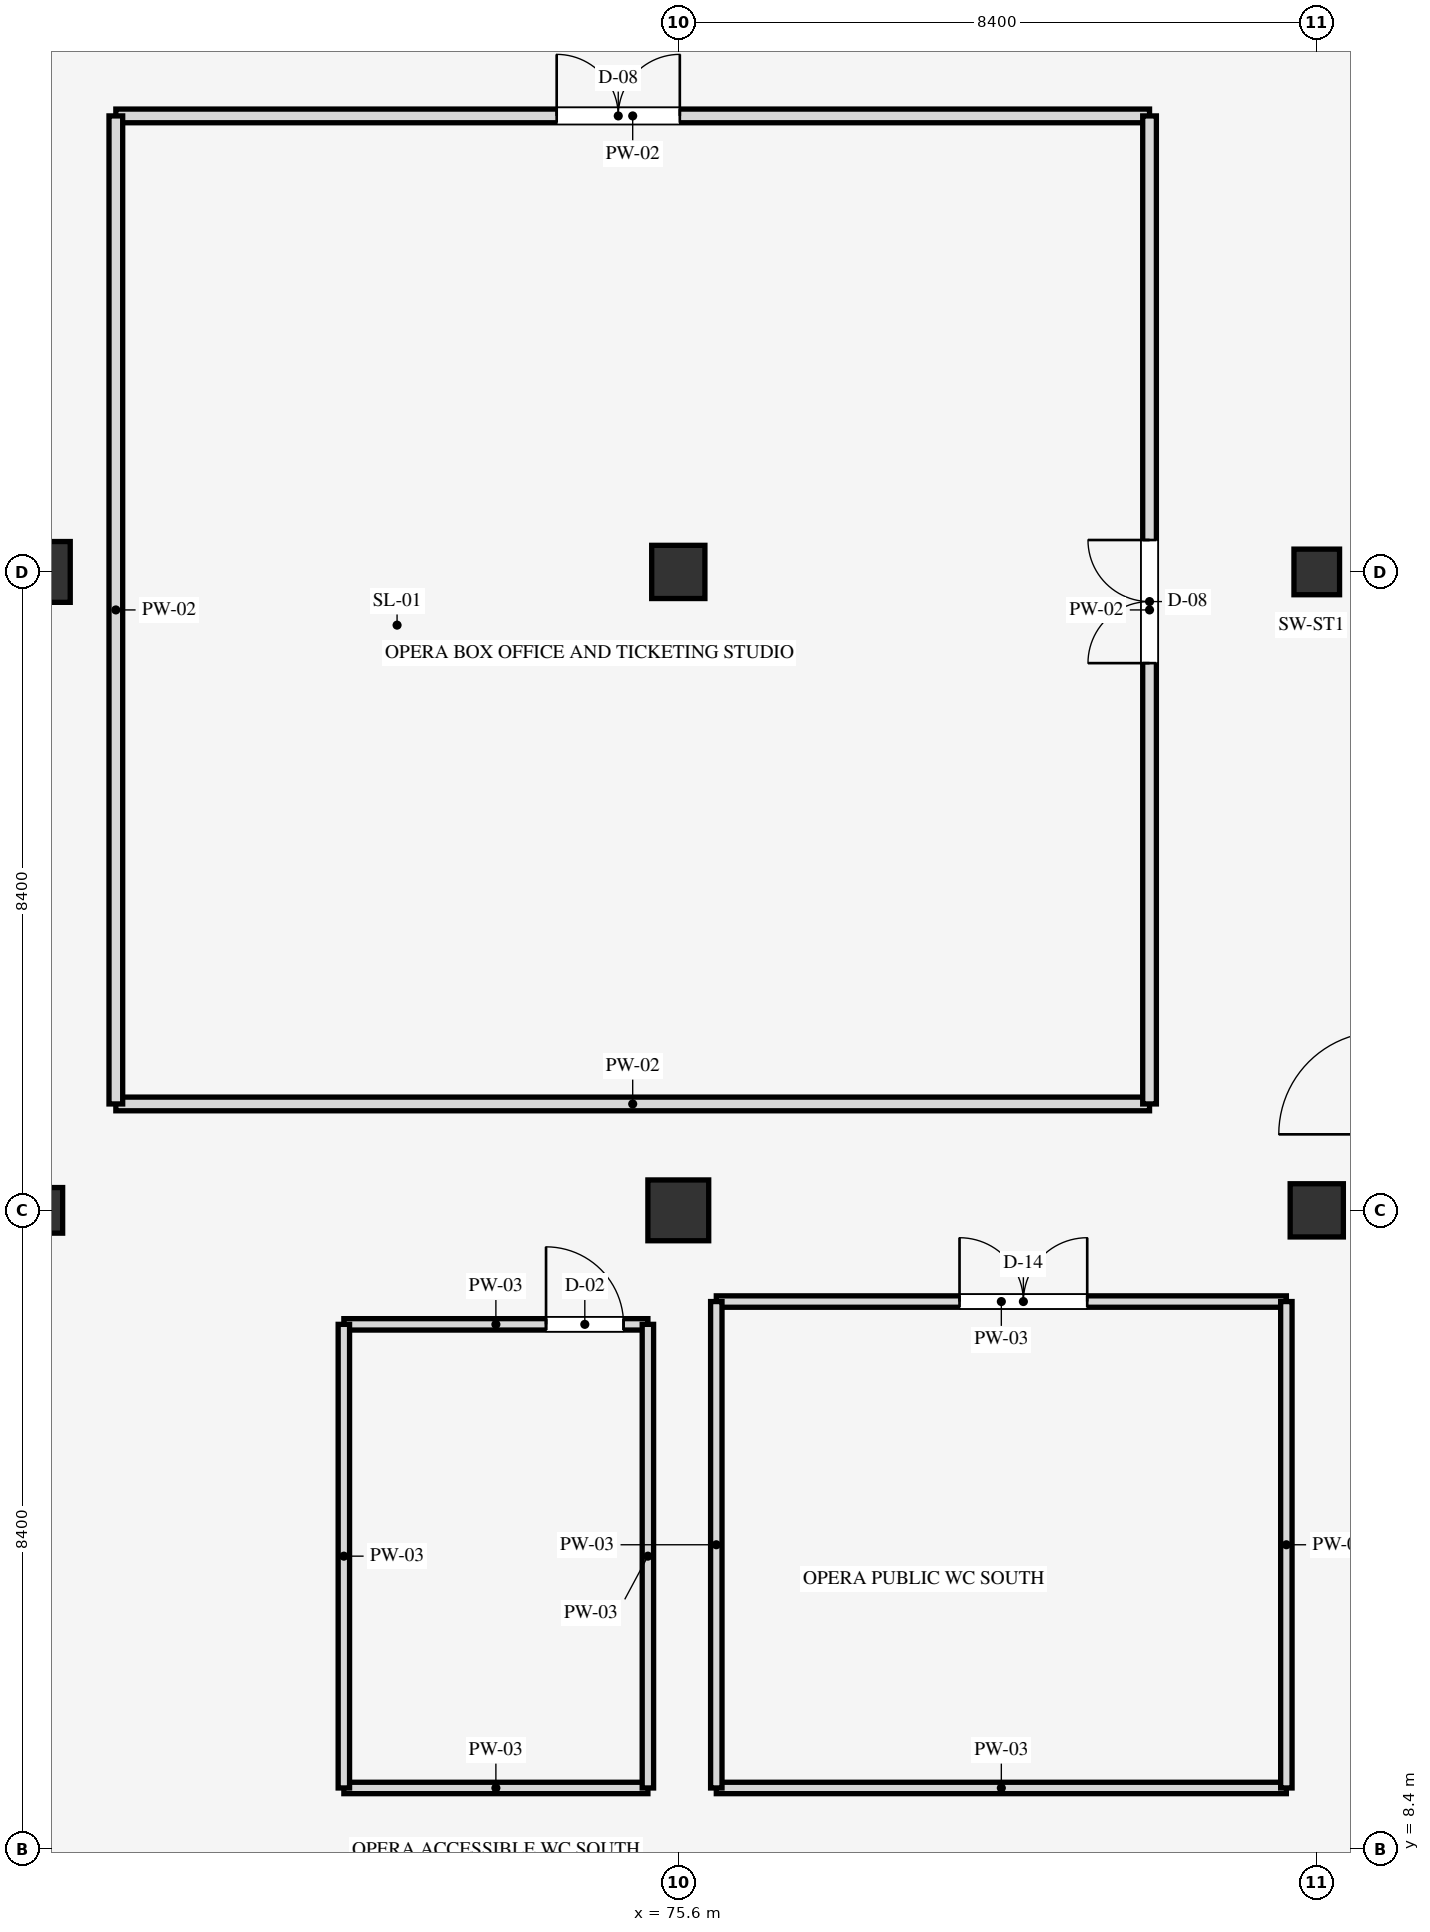
"""IFC4 building model, lengths in metres.
Left out: names, types, materials, properties, quantities, classifications, styles, units other than length and angle.
Written with IfcOpenShell. Run it as: python <this file> out.ifc"""

import sys

from ifc_helpers import new_model, si_unit, direction, frame, frame_2d, origin, origin_2d, place, context, subcontext, project, spatial, rectangle, extrude, element, fill, save


model = new_model("IFC4")
c1 = context("Model", 3, precision=1e-05, world=origin(), true_north=direction((0.0, 1.0)))
c2 = subcontext(c1, "Body", "Model", "MODEL_VIEW")
j1 = project(units=[si_unit("LENGTHUNIT", "METRE"), si_unit("PLANEANGLEUNIT", "RADIAN")], contexts=[c1])
p1 = place(None, origin())
s1 = spatial("IfcSite", under=j1, at=p1, CompositionType="ELEMENT")
p2 = place(p1, origin())
s2 = spatial("IfcBuilding", under=s1, at=p2, CompositionType="ELEMENT")
p3 = place(p2, origin())
s3 = spatial("IfcBuildingStorey", under=s2, at=p3, CompositionType="ELEMENT", Elevation=0.0)
p4 = place(p3, frame((67.2, 16.8, 0.0), z_axis=(0.0, 0.0, 1.0), x_axis=(1.0, 0.0, 0.0)))
e1 = element("IfcColumn", 1, at=p4, inside=s3, PredefinedType="COLUMN", context=c2, shape_type="SweptSolid", body=[
    extrude(rectangle(XDim=0.6, YDim=0.6, at=origin_2d()), origin(), (0.0, 0.0, 1.0), 5.4),
])
for number, where, z_axis, x_axis in (
    (2, (67.2, 25.2, 0.0), (0.0, 0.0, 1.0), (1.0, 0.0, 0.0)),
    (3, (75.6, 16.8, 0.0), (0.0, 0.0, 1.0), (1.0, 0.0, 0.0)),
):
    element("IfcColumn", number, at=place(p3, frame(where, z_axis=z_axis, x_axis=x_axis)), inside=s3, PredefinedType="COLUMN", context=c2, shape_type="SweptSolid", body=[
        extrude(rectangle(XDim=0.8, YDim=0.8, at=origin_2d()), origin(), (0.0, 0.0, 1.0), 5.4),
    ])
for number, where, z_axis, x_axis in (
    (4, (75.6, 25.2, 0.0), (0.0, 0.0, 1.0), (1.0, 0.0, 0.0)),
    (5, (84.0, 16.8, 0.0), (0.0, 0.0, 1.0), (1.0, 0.0, 0.0)),
):
    element("IfcColumn", number, at=place(p3, frame(where, z_axis=z_axis, x_axis=x_axis)), inside=s3, PredefinedType="COLUMN", context=c2, shape_type="SweptSolid", body=[
        extrude(rectangle(XDim=0.7, YDim=0.7, at=origin_2d()), origin(), (0.0, 0.0, 1.0), 5.4),
    ])
p5 = place(p3, frame((84.0, 25.2, 0.0), z_axis=(0.0, 0.0, 1.0), x_axis=(1.0, 0.0, 0.0)))
e6 = element("IfcColumn", 6, at=p5, inside=s3, PredefinedType="COLUMN", context=c2, shape_type="SweptSolid", body=[
    extrude(rectangle(XDim=0.6, YDim=0.6, at=origin_2d()), origin(), (0.0, 0.0, 1.0), 5.4),
])
p6 = place(p3, frame((76.1, 9.2, 0.0), z_axis=(0.0, 0.0, 1.0), x_axis=(1.0, 0.0, 0.0)))
e7 = element("IfcWall", 7, at=p6, inside=s3, PredefinedType="PARTITIONING", context=c2, shape_type="SweptSolid", body=[
    extrude(rectangle(XDim=7.5, YDim=0.15, at=frame_2d((3.75, 0.0))), origin(), (0.0, 0.0, 1.0), 4.44),
])
p7 = place(p3, frame((76.1, 15.6, 0.0), z_axis=(0.0, 0.0, 1.0), x_axis=(1.0, 0.0, 0.0)))
e8 = element("IfcWall", 8, at=p7, inside=s3, PredefinedType="PARTITIONING", context=c2, shape_type="SweptSolid", body=[
    extrude(rectangle(XDim=7.5, YDim=0.15, at=frame_2d((3.75, 0.0))), origin(), (0.0, 0.0, 1.0), 4.44),
])
p8 = place(p7, frame((3.2, 0.0, 0.0)))
e9 = element("IfcOpeningElement", 9, at=p8, cuts=e8, PredefinedType="OPENING", context=c2, shape_type="SweptSolid", body=[
    extrude(rectangle(XDim=1.68, YDim=2.24, at=frame_2d((0.84, 1.12))), frame((0.0, 0.085, 0.0), z_axis=(0.0, -1.0, 0.0), x_axis=(1.0, 0.0, 0.0)), (0.0, 0.0, 1.0), 0.17),
])
for number, where, z_axis, x_axis in (
    (10, (76.1, 9.2, 0.0), (0.0, 0.0, 1.0), (0.0, 1.0, 0.0)),
    (11, (83.6, 9.2, 0.0), (0.0, 0.0, 1.0), (0.0, 1.0, 0.0)),
):
    element("IfcWall", number, at=place(p3, frame(where, z_axis=z_axis, x_axis=x_axis)), inside=s3, PredefinedType="PARTITIONING", context=c2, shape_type="SweptSolid", body=[
        extrude(rectangle(XDim=6.4, YDim=0.15, at=frame_2d((3.2, 0.0))), origin(), (0.0, 0.0, 1.0), 4.44),
    ])
p9 = place(p3, frame((71.2, 9.2, 0.0), z_axis=(0.0, 0.0, 1.0), x_axis=(1.0, 0.0, 0.0)))
e12 = element("IfcWall", 12, at=p9, inside=s3, PredefinedType="PARTITIONING", context=c2, shape_type="SweptSolid", body=[
    extrude(rectangle(XDim=4.0, YDim=0.15, at=frame_2d((2.0, 0.0))), origin(), (0.0, 0.0, 1.0), 4.44),
])
p10 = place(p3, frame((71.2, 15.3, 0.0), z_axis=(0.0, 0.0, 1.0), x_axis=(1.0, 0.0, 0.0)))
e13 = element("IfcWall", 13, at=p10, inside=s3, PredefinedType="PARTITIONING", context=c2, shape_type="SweptSolid", body=[
    extrude(rectangle(XDim=4.0, YDim=0.15, at=frame_2d((2.0, 0.0))), origin(), (0.0, 0.0, 1.0), 4.44),
])
p11 = place(p10, frame((2.66, 0.0, 0.0)))
e14 = element("IfcOpeningElement", 14, at=p11, cuts=e13, PredefinedType="OPENING", context=c2, shape_type="SweptSolid", body=[
    extrude(rectangle(XDim=1.02, YDim=2.1, at=frame_2d((0.51, 1.05))), frame((0.0, 0.085, 0.0), z_axis=(0.0, -1.0, 0.0), x_axis=(1.0, 0.0, 0.0)), (0.0, 0.0, 1.0), 0.17),
])
for number, where, z_axis, x_axis in (
    (15, (71.2, 9.2, 0.0), (0.0, 0.0, 1.0), (0.0, 1.0, 0.0)),
    (16, (75.2, 9.2, 0.0), (0.0, 0.0, 1.0), (0.0, 1.0, 0.0)),
):
    element("IfcWall", number, at=place(p3, frame(where, z_axis=z_axis, x_axis=x_axis)), inside=s3, PredefinedType="PARTITIONING", context=c2, shape_type="SweptSolid", body=[
        extrude(rectangle(XDim=6.1, YDim=0.15, at=frame_2d((3.05, 0.0))), origin(), (0.0, 0.0, 1.0), 4.44),
    ])
p12 = place(p3, frame((68.2, 18.2, 0.0), z_axis=(0.0, 0.0, 1.0), x_axis=(1.0, 0.0, 0.0)))
e17 = element("IfcWall", 17, at=p12, inside=s3, PredefinedType="PARTITIONING", context=c2, shape_type="SweptSolid", body=[
    extrude(rectangle(XDim=13.6, YDim=0.18, at=frame_2d((6.8, 0.0))), origin(), (0.0, 0.0, 1.0), 4.44),
])
p13 = place(p3, frame((68.2, 31.2, 0.0), z_axis=(0.0, 0.0, 1.0), x_axis=(1.0, 0.0, 0.0)))
e18 = element("IfcWall", 18, at=p13, inside=s3, PredefinedType="PARTITIONING", context=c2, shape_type="SweptSolid", body=[
    extrude(rectangle(XDim=13.6, YDim=0.18, at=frame_2d((6.8, 0.0))), origin(), (0.0, 0.0, 1.0), 4.44),
])
p14 = place(p13, frame((5.8, 0.0, 0.0)))
e19 = element("IfcOpeningElement", 19, at=p14, cuts=e18, PredefinedType="OPENING", context=c2, shape_type="SweptSolid", body=[
    extrude(rectangle(XDim=1.62, YDim=2.22, at=frame_2d((0.81, 1.11))), frame((0.0, 0.1, 0.0), z_axis=(0.0, -1.0, 0.0), x_axis=(1.0, 0.0, 0.0)), (0.0, 0.0, 1.0), 0.2),
])
p15 = place(p3, frame((68.2, 18.2, 0.0), z_axis=(0.0, 0.0, 1.0), x_axis=(0.0, 1.0, 0.0)))
e20 = element("IfcWall", 20, at=p15, inside=s3, PredefinedType="PARTITIONING", context=c2, shape_type="SweptSolid", body=[
    extrude(rectangle(XDim=13.0, YDim=0.18, at=frame_2d((6.5, 0.0))), origin(), (0.0, 0.0, 1.0), 4.44),
])
p16 = place(p3, frame((81.8, 18.2, 0.0), z_axis=(0.0, 0.0, 1.0), x_axis=(0.0, 1.0, 0.0)))
e21 = element("IfcWall", 21, at=p16, inside=s3, PredefinedType="PARTITIONING", context=c2, shape_type="SweptSolid", body=[
    extrude(rectangle(XDim=13.0, YDim=0.18, at=frame_2d((6.5, 0.0))), origin(), (0.0, 0.0, 1.0), 4.44),
])
p17 = place(p16, frame((5.8, 0.0, 0.0)))
e22 = element("IfcOpeningElement", 22, at=p17, cuts=e21, PredefinedType="OPENING", context=c2, shape_type="SweptSolid", body=[
    extrude(rectangle(XDim=1.62, YDim=2.22, at=frame_2d((0.81, 1.11))), frame((0.0, 0.1, 0.0), z_axis=(0.0, -1.0, 0.0), x_axis=(1.0, 0.0, 0.0)), (0.0, 0.0, 1.0), 0.2),
])
p18 = place(p8, origin())
e23 = element("IfcDoor", 23, at=p18, inside=s3, OperationType="DOUBLE_DOOR_SINGLE_SWING", PredefinedType="DOOR", context=c2, shape_type="SweptSolid", body=[
    extrude(rectangle(XDim=1.68, YDim=2.24, at=frame_2d((0.84, 1.12))), frame((0.0, 0.025, 0.0), z_axis=(0.0, -1.0, 0.0), x_axis=(1.0, 0.0, 0.0)), (0.0, 0.0, 1.0), 0.05),
])
fill(e9, e23)
p19 = place(p11, origin())
e24 = element("IfcDoor", 24, at=p19, inside=s3, OperationType="SINGLE_SWING_LEFT", PredefinedType="DOOR", context=c2, shape_type="SweptSolid", body=[
    extrude(rectangle(XDim=1.02, YDim=2.1, at=frame_2d((0.51, 1.05))), frame((0.0, 0.025, 0.0), z_axis=(0.0, -1.0, 0.0), x_axis=(1.0, 0.0, 0.0)), (0.0, 0.0, 1.0), 0.05),
])
fill(e14, e24)
p20 = place(p14, origin())
e25 = element("IfcDoor", 25, at=p20, inside=s3, OperationType="DOUBLE_DOOR_SINGLE_SWING", PredefinedType="DOOR", context=c2, shape_type="SweptSolid", body=[
    extrude(rectangle(XDim=1.62, YDim=2.22, at=frame_2d((0.81, 1.11))), frame((0.0, 0.025, 0.0), z_axis=(0.0, -1.0, 0.0), x_axis=(1.0, 0.0, 0.0)), (0.0, 0.0, 1.0), 0.05),
])
fill(e19, e25)
p21 = place(p17, origin())
e26 = element("IfcDoor", 26, at=p21, inside=s3, OperationType="DOUBLE_DOOR_SINGLE_SWING", PredefinedType="DOOR", context=c2, shape_type="SweptSolid", body=[
    extrude(rectangle(XDim=1.62, YDim=2.22, at=frame_2d((0.81, 1.11))), frame((0.0, 0.025, 0.0), z_axis=(0.0, -1.0, 0.0), x_axis=(1.0, 0.0, 0.0)), (0.0, 0.0, 1.0), 0.05),
])
fill(e22, e26)
save(model, sys.argv[1])
